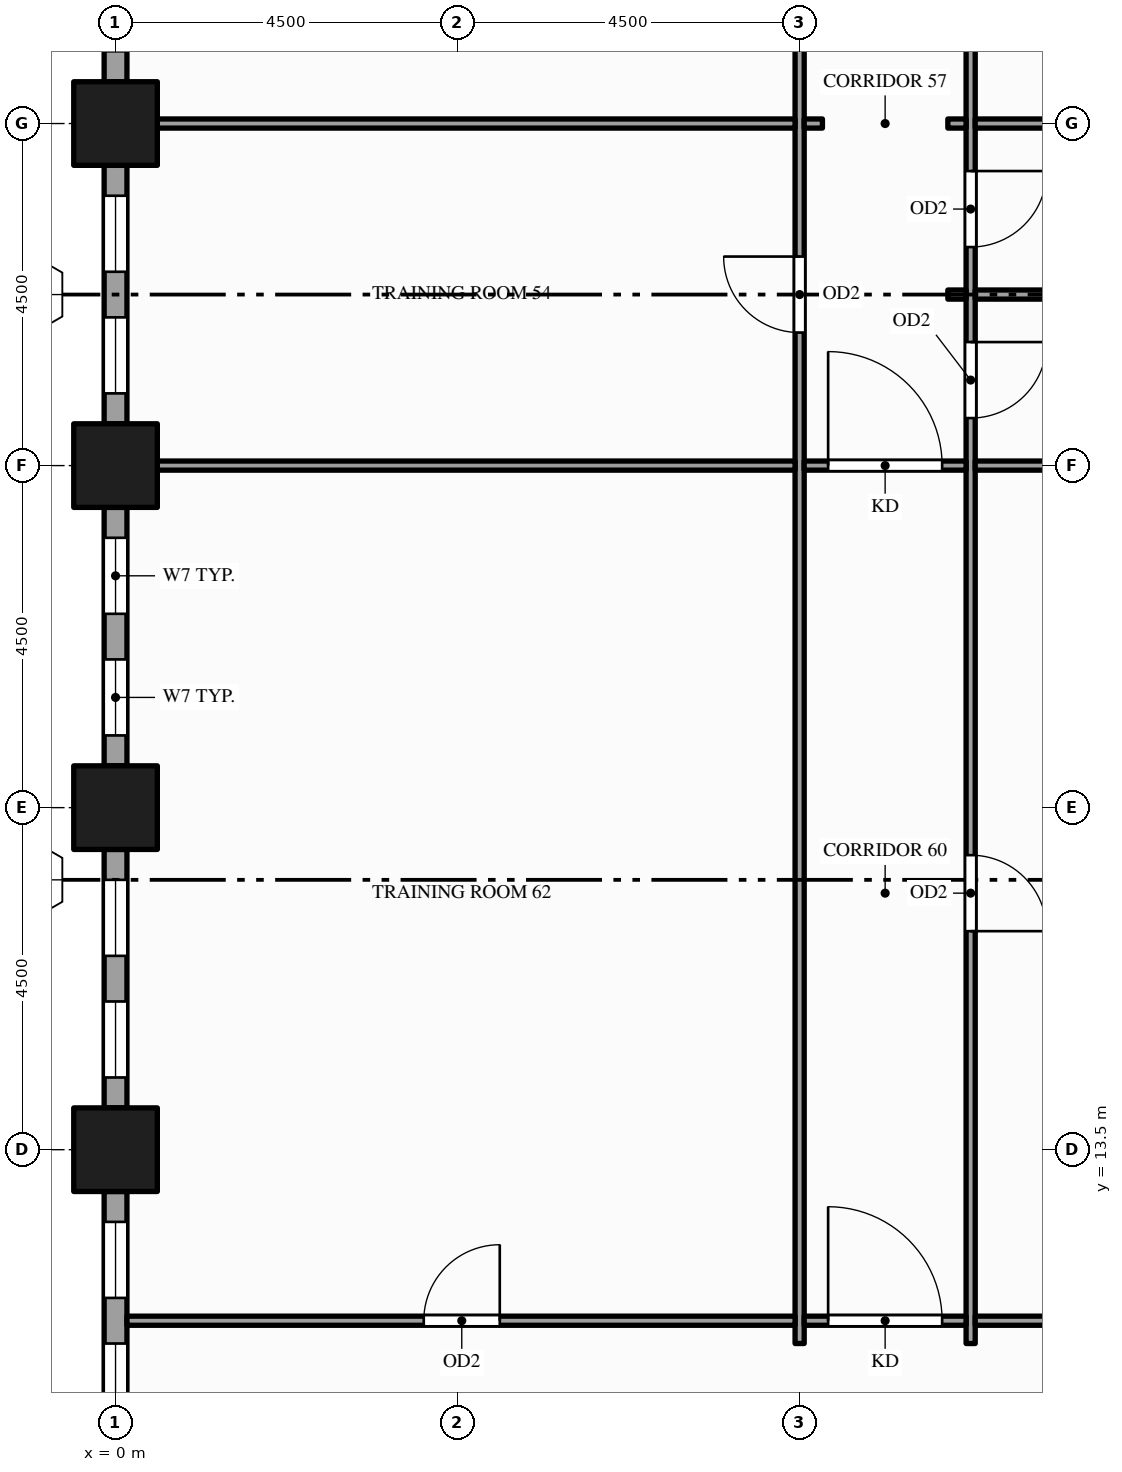
"""IFC4 building model, lengths in metres.
Left out: names, types, materials, properties, quantities, classifications, styles, units other than length and angle.
Written with IfcOpenShell. Run it as: python <this file> out.ifc"""

import sys

from ifc_helpers import new_model, si_unit, direction, frame, frame_2d, origin, origin_2d, place, context, subcontext, project, spatial, rectangle, hollow_rectangle, extrude, element, fill, save


model = new_model("IFC4")
c1 = context("Model", 3, precision=1e-05, world=origin(), true_north=direction((0.0, 1.0)))
c2 = subcontext(c1, "Body", "Model", "MODEL_VIEW")
j1 = project(units=[si_unit("LENGTHUNIT", "METRE"), si_unit("PLANEANGLEUNIT", "RADIAN")], contexts=[c1])
p1 = place(None, origin())
s1 = spatial("IfcSite", under=j1, at=p1, CompositionType="ELEMENT")
p2 = place(p1, origin())
s2 = spatial("IfcBuilding", under=s1, at=p2, CompositionType="ELEMENT")
p3 = place(p2, frame((0.0, 0.0, 24.0)))
s3 = spatial("IfcBuildingStorey", under=s2, at=p3, CompositionType="ELEMENT", Elevation=24.0)
for number, where, z_axis, x_axis in (
    (1, (0.0, 13.5, -0.25), (0.0, 0.0, 1.0), (1.0, 0.0, 0.0)),
    (2, (0.0, 18.0, -0.25), (0.0, 0.0, 1.0), (1.0, 0.0, 0.0)),
    (3, (0.0, 22.5, -0.25), (0.0, 0.0, 1.0), (1.0, 0.0, 0.0)),
    (4, (0.0, 27.0, -0.25), (0.0, 0.0, 1.0), (1.0, 0.0, 0.0)),
):
    element("IfcColumn", number, at=place(p3, frame(where, z_axis=z_axis, x_axis=x_axis)), inside=s3, PredefinedType="COLUMN", context=c2, shape_type="SweptSolid", body=[
        extrude(hollow_rectangle(XDim=1.1, YDim=1.1, WallThickness=0.06, at=origin_2d()), origin(), (0.0, 0.0, 1.0), 5.1),
    ])
p4 = place(p3, frame((0.0, 30.95, 0.0), z_axis=(0.0, 0.0, 1.0), x_axis=(0.0, -1.0, 0.0)))
e5 = element("IfcWall", 5, at=p4, inside=s3, PredefinedType="STANDARD", context=c2, shape_type="SweptSolid", body=[
    extrude(rectangle(XDim=3.4, YDim=0.3, at=frame_2d((1.7, 0.0))), origin(), (0.0, 0.0, 1.0), 3.938),
])
p5 = place(p4, frame((0.4, 0.0, 0.9)))
e6 = element("IfcOpeningElement", 6, at=p5, cuts=e5, PredefinedType="OPENING", context=c2, shape_type="SweptSolid", body=[
    extrude(rectangle(XDim=1.0, YDim=2.75, at=frame_2d((0.5, 1.375))), frame((0.0, 0.16, 0.0), z_axis=(0.0, -1.0, 0.0), x_axis=(1.0, 0.0, 0.0)), (0.0, 0.0, 1.0), 0.32),
])
p6 = place(p4, frame((2.0, 0.0, 0.9)))
e7 = element("IfcOpeningElement", 7, at=p6, cuts=e5, PredefinedType="OPENING", context=c2, shape_type="SweptSolid", body=[
    extrude(rectangle(XDim=1.0, YDim=2.75, at=frame_2d((0.5, 1.375))), frame((0.0, 0.16, 0.0), z_axis=(0.0, -1.0, 0.0), x_axis=(1.0, 0.0, 0.0)), (0.0, 0.0, 1.0), 0.32),
])
p7 = place(p3, frame((0.0, 26.45, 0.0), z_axis=(0.0, 0.0, 1.0), x_axis=(0.0, -1.0, 0.0)))
e8 = element("IfcWall", 8, at=p7, inside=s3, PredefinedType="STANDARD", context=c2, shape_type="SweptSolid", body=[
    extrude(rectangle(XDim=3.4, YDim=0.3, at=frame_2d((1.7, 0.0))), origin(), (0.0, 0.0, 1.0), 3.938),
])
p8 = place(p7, frame((0.4, 0.0, 0.9)))
e9 = element("IfcOpeningElement", 9, at=p8, cuts=e8, PredefinedType="OPENING", context=c2, shape_type="SweptSolid", body=[
    extrude(rectangle(XDim=1.0, YDim=2.75, at=frame_2d((0.5, 1.375))), frame((0.0, 0.16, 0.0), z_axis=(0.0, -1.0, 0.0), x_axis=(1.0, 0.0, 0.0)), (0.0, 0.0, 1.0), 0.32),
])
p9 = place(p7, frame((2.0, 0.0, 0.9)))
e10 = element("IfcOpeningElement", 10, at=p9, cuts=e8, PredefinedType="OPENING", context=c2, shape_type="SweptSolid", body=[
    extrude(rectangle(XDim=1.0, YDim=2.75, at=frame_2d((0.5, 1.375))), frame((0.0, 0.16, 0.0), z_axis=(0.0, -1.0, 0.0), x_axis=(1.0, 0.0, 0.0)), (0.0, 0.0, 1.0), 0.32),
])
p10 = place(p3, frame((0.0, 21.95, 0.0), z_axis=(0.0, 0.0, 1.0), x_axis=(0.0, -1.0, 0.0)))
e11 = element("IfcWall", 11, at=p10, inside=s3, PredefinedType="STANDARD", context=c2, shape_type="SweptSolid", body=[
    extrude(rectangle(XDim=3.4, YDim=0.3, at=frame_2d((1.7, 0.0))), origin(), (0.0, 0.0, 1.0), 4.136),
])
p11 = place(p10, frame((0.4, 0.0, 0.9)))
e12 = element("IfcOpeningElement", 12, at=p11, cuts=e11, PredefinedType="OPENING", context=c2, shape_type="SweptSolid", body=[
    extrude(rectangle(XDim=1.0, YDim=3.0, at=frame_2d((0.5, 1.5))), frame((0.0, 0.16, 0.0), z_axis=(0.0, -1.0, 0.0), x_axis=(1.0, 0.0, 0.0)), (0.0, 0.0, 1.0), 0.32),
])
p12 = place(p10, frame((2.0, 0.0, 0.9)))
e13 = element("IfcOpeningElement", 13, at=p12, cuts=e11, PredefinedType="OPENING", context=c2, shape_type="SweptSolid", body=[
    extrude(rectangle(XDim=1.0, YDim=3.0, at=frame_2d((0.5, 1.5))), frame((0.0, 0.16, 0.0), z_axis=(0.0, -1.0, 0.0), x_axis=(1.0, 0.0, 0.0)), (0.0, 0.0, 1.0), 0.32),
])
p13 = place(p3, frame((0.0, 17.45, 0.0), z_axis=(0.0, 0.0, 1.0), x_axis=(0.0, -1.0, 0.0)))
e14 = element("IfcWall", 14, at=p13, inside=s3, PredefinedType="STANDARD", context=c2, shape_type="SweptSolid", body=[
    extrude(rectangle(XDim=3.4, YDim=0.3, at=frame_2d((1.7, 0.0))), origin(), (0.0, 0.0, 1.0), 4.136),
])
p14 = place(p13, frame((0.4, 0.0, 0.9)))
e15 = element("IfcOpeningElement", 15, at=p14, cuts=e14, PredefinedType="OPENING", context=c2, shape_type="SweptSolid", body=[
    extrude(rectangle(XDim=1.0, YDim=3.0, at=frame_2d((0.5, 1.5))), frame((0.0, 0.16, 0.0), z_axis=(0.0, -1.0, 0.0), x_axis=(1.0, 0.0, 0.0)), (0.0, 0.0, 1.0), 0.32),
])
p15 = place(p13, frame((2.0, 0.0, 0.9)))
e16 = element("IfcOpeningElement", 16, at=p15, cuts=e14, PredefinedType="OPENING", context=c2, shape_type="SweptSolid", body=[
    extrude(rectangle(XDim=1.0, YDim=3.0, at=frame_2d((0.5, 1.5))), frame((0.0, 0.16, 0.0), z_axis=(0.0, -1.0, 0.0), x_axis=(1.0, 0.0, 0.0)), (0.0, 0.0, 1.0), 0.32),
])
p16 = place(p3, frame((0.0, 12.95, 0.0), z_axis=(0.0, 0.0, 1.0), x_axis=(0.0, -1.0, 0.0)))
e17 = element("IfcWall", 17, at=p16, inside=s3, PredefinedType="STANDARD", context=c2, shape_type="SweptSolid", body=[
    extrude(rectangle(XDim=3.4, YDim=0.3, at=frame_2d((1.7, 0.0))), origin(), (0.0, 0.0, 1.0), 4.136),
])
p17 = place(p16, frame((0.4, 0.0, 0.9)))
e18 = element("IfcOpeningElement", 18, at=p17, cuts=e17, PredefinedType="OPENING", context=c2, shape_type="SweptSolid", body=[
    extrude(rectangle(XDim=1.0, YDim=3.0, at=frame_2d((0.5, 1.5))), frame((0.0, 0.16, 0.0), z_axis=(0.0, -1.0, 0.0), x_axis=(1.0, 0.0, 0.0)), (0.0, 0.0, 1.0), 0.32),
])
p18 = place(p16, frame((2.0, 0.0, 0.9)))
e19 = element("IfcOpeningElement", 19, at=p18, cuts=e17, PredefinedType="OPENING", context=c2, shape_type="SweptSolid", body=[
    extrude(rectangle(XDim=1.0, YDim=3.0, at=frame_2d((0.5, 1.5))), frame((0.0, 0.16, 0.0), z_axis=(0.0, -1.0, 0.0), x_axis=(1.0, 0.0, 0.0)), (0.0, 0.0, 1.0), 0.32),
])
p19 = place(p3, frame((9.0, 10.95, 0.0), z_axis=(0.0, 0.0, 1.0), x_axis=(0.0, 1.0, 0.0)))
e20 = element("IfcWall", 20, at=p19, inside=s3, PredefinedType="PARTITIONING", context=c2, shape_type="SweptSolid", body=[
    extrude(rectangle(XDim=20.85, YDim=0.12, at=frame_2d((10.425, 0.0))), origin(), (0.0, 0.0, 1.0), 3.6),
])
p20 = place(p19, frame((13.3, 0.0, 0.0)))
e21 = element("IfcOpeningElement", 21, at=p20, cuts=e20, PredefinedType="OPENING", context=c2, shape_type="SweptSolid", body=[
    extrude(rectangle(XDim=1.0, YDim=2.1, at=frame_2d((0.5, 1.05))), frame((0.0, 0.07, 0.0), z_axis=(0.0, -1.0, 0.0), x_axis=(1.0, 0.0, 0.0)), (0.0, 0.0, 1.0), 0.14),
])
p21 = place(p19, frame((17.8, 0.0, 0.0)))
e22 = element("IfcOpeningElement", 22, at=p21, cuts=e20, PredefinedType="OPENING", context=c2, shape_type="SweptSolid", body=[
    extrude(rectangle(XDim=1.0, YDim=2.1, at=frame_2d((0.5, 1.05))), frame((0.0, 0.07, 0.0), z_axis=(0.0, -1.0, 0.0), x_axis=(1.0, 0.0, 0.0)), (0.0, 0.0, 1.0), 0.14),
])
p22 = place(p3, frame((11.25, 10.95, 0.0), z_axis=(0.0, 0.0, 1.0), x_axis=(0.0, 1.0, 0.0)))
e23 = element("IfcWall", 23, at=p22, inside=s3, PredefinedType="PARTITIONING", context=c2, shape_type="SweptSolid", body=[
    extrude(rectangle(XDim=20.85, YDim=0.12, at=frame_2d((10.425, 0.0))), origin(), (0.0, 0.0, 1.0), 3.6),
])
p23 = place(p22, frame((5.425, 0.0, 0.0)))
e24 = element("IfcOpeningElement", 24, at=p23, cuts=e23, PredefinedType="OPENING", context=c2, shape_type="SweptSolid", body=[
    extrude(rectangle(XDim=1.0, YDim=2.1, at=frame_2d((0.5, 1.05))), frame((0.0, 0.07, 0.0), z_axis=(0.0, -1.0, 0.0), x_axis=(1.0, 0.0, 0.0)), (0.0, 0.0, 1.0), 0.14),
])
p24 = place(p22, frame((12.175, 0.0, 0.0)))
e25 = element("IfcOpeningElement", 25, at=p24, cuts=e23, PredefinedType="OPENING", context=c2, shape_type="SweptSolid", body=[
    extrude(rectangle(XDim=1.0, YDim=2.1, at=frame_2d((0.5, 1.05))), frame((0.0, 0.07, 0.0), z_axis=(0.0, -1.0, 0.0), x_axis=(1.0, 0.0, 0.0)), (0.0, 0.0, 1.0), 0.14),
])
p25 = place(p22, frame((14.425, 0.0, 0.0)))
e26 = element("IfcOpeningElement", 26, at=p25, cuts=e23, PredefinedType="OPENING", context=c2, shape_type="SweptSolid", body=[
    extrude(rectangle(XDim=1.0, YDim=2.1, at=frame_2d((0.5, 1.05))), frame((0.0, 0.07, 0.0), z_axis=(0.0, -1.0, 0.0), x_axis=(1.0, 0.0, 0.0)), (0.0, 0.0, 1.0), 0.14),
])
p26 = place(p22, frame((17.8, 0.0, 0.0)))
e27 = element("IfcOpeningElement", 27, at=p26, cuts=e23, PredefinedType="OPENING", context=c2, shape_type="SweptSolid", body=[
    extrude(rectangle(XDim=1.0, YDim=2.1, at=frame_2d((0.5, 1.05))), frame((0.0, 0.07, 0.0), z_axis=(0.0, -1.0, 0.0), x_axis=(1.0, 0.0, 0.0)), (0.0, 0.0, 1.0), 0.14),
])
p27 = place(p3, frame((0.15, 11.25, 0.0), z_axis=(0.0, 0.0, 1.0), x_axis=(1.0, 0.0, 0.0)))
e28 = element("IfcWall", 28, at=p27, inside=s3, PredefinedType="PARTITIONING", context=c2, shape_type="SweptSolid", body=[
    extrude(rectangle(XDim=8.79, YDim=0.12, at=frame_2d((4.395, 0.0))), origin(), (0.0, 0.0, 1.0), 3.938),
])
p28 = place(p27, frame((3.905, 0.0, 0.0)))
e29 = element("IfcOpeningElement", 29, at=p28, cuts=e28, PredefinedType="OPENING", context=c2, shape_type="SweptSolid", body=[
    extrude(rectangle(XDim=1.0, YDim=2.1, at=frame_2d((0.5, 1.05))), frame((0.0, 0.07, 0.0), z_axis=(0.0, -1.0, 0.0), x_axis=(1.0, 0.0, 0.0)), (0.0, 0.0, 1.0), 0.14),
])
p29 = place(p3, frame((9.06, 11.25, 0.0), z_axis=(0.0, 0.0, 1.0), x_axis=(1.0, 0.0, 0.0)))
e30 = element("IfcWall", 30, at=p29, inside=s3, PredefinedType="PARTITIONING", context=c2, shape_type="SweptSolid", body=[
    extrude(rectangle(XDim=2.13, YDim=0.12, at=frame_2d((1.065, 0.0))), origin(), (0.0, 0.0, 1.0), 3.938),
])
p30 = place(p29, frame((0.315, 0.0, 0.0)))
e31 = element("IfcOpeningElement", 31, at=p30, cuts=e30, PredefinedType="OPENING", context=c2, shape_type="SweptSolid", body=[
    extrude(rectangle(XDim=1.5, YDim=2.1, at=frame_2d((0.75, 1.05))), frame((0.0, 0.07, 0.0), z_axis=(0.0, -1.0, 0.0), x_axis=(1.0, 0.0, 0.0)), (0.0, 0.0, 1.0), 0.14),
])
p31 = place(p3, frame((11.31, 11.25, 0.0), z_axis=(0.0, 0.0, 1.0), x_axis=(1.0, 0.0, 0.0)))
e32 = element("IfcWall", 32, at=p31, inside=s3, PredefinedType="PARTITIONING", context=c2, shape_type="SweptSolid", body=[
    extrude(rectangle(XDim=11.13, YDim=0.12, at=frame_2d((5.565, 0.0))), origin(), (0.0, 0.0, 1.0), 3.938),
])
p32 = place(p3, frame((0.15, 22.5, 0.0), z_axis=(0.0, 0.0, 1.0), x_axis=(1.0, 0.0, 0.0)))
e33 = element("IfcWall", 33, at=p32, inside=s3, PredefinedType="PARTITIONING", context=c2, shape_type="SweptSolid", body=[
    extrude(rectangle(XDim=8.79, YDim=0.12, at=frame_2d((4.395, 0.0))), origin(), (0.0, 0.0, 1.0), 3.6),
])
p33 = place(p3, frame((9.06, 22.5, 0.0), z_axis=(0.0, 0.0, 1.0), x_axis=(1.0, 0.0, 0.0)))
e34 = element("IfcWall", 34, at=p33, inside=s3, PredefinedType="PARTITIONING", context=c2, shape_type="SweptSolid", body=[
    extrude(rectangle(XDim=2.13, YDim=0.12, at=frame_2d((1.065, 0.0))), origin(), (0.0, 0.0, 1.0), 3.6),
])
p34 = place(p33, frame((0.315, 0.0, 0.0)))
e35 = element("IfcOpeningElement", 35, at=p34, cuts=e34, PredefinedType="OPENING", context=c2, shape_type="SweptSolid", body=[
    extrude(rectangle(XDim=1.5, YDim=2.1, at=frame_2d((0.75, 1.05))), frame((0.0, 0.07, 0.0), z_axis=(0.0, -1.0, 0.0), x_axis=(1.0, 0.0, 0.0)), (0.0, 0.0, 1.0), 0.14),
])
p35 = place(p3, frame((11.31, 22.5, 0.0), z_axis=(0.0, 0.0, 1.0), x_axis=(1.0, 0.0, 0.0)))
e36 = element("IfcWall", 36, at=p35, inside=s3, PredefinedType="PARTITIONING", context=c2, shape_type="SweptSolid", body=[
    extrude(rectangle(XDim=11.13, YDim=0.12, at=frame_2d((5.565, 0.0))), origin(), (0.0, 0.0, 1.0), 3.6),
])
p36 = place(p3, frame((10.95, 24.75, 0.0), z_axis=(0.0, 0.0, 1.0), x_axis=(1.0, 0.0, 0.0)))
e37 = element("IfcWall", 37, at=p36, inside=s3, PredefinedType="PARTITIONING", context=c2, shape_type="SweptSolid", body=[
    extrude(rectangle(XDim=0.24, YDim=0.12, at=frame_2d((0.12, 0.0))), origin(), (0.0, 0.0, 1.0), 3.938),
])
p37 = place(p3, frame((11.31, 24.75, 0.0), z_axis=(0.0, 0.0, 1.0), x_axis=(1.0, 0.0, 0.0)))
e38 = element("IfcWall", 38, at=p37, inside=s3, PredefinedType="PARTITIONING", context=c2, shape_type="SweptSolid", body=[
    extrude(rectangle(XDim=11.13, YDim=0.12, at=frame_2d((5.565, 0.0))), origin(), (0.0, 0.0, 1.0), 3.938),
])
p38 = place(p3, frame((0.15, 27.0, 0.0), z_axis=(0.0, 0.0, 1.0), x_axis=(1.0, 0.0, 0.0)))
e39 = element("IfcWall", 39, at=p38, inside=s3, PredefinedType="PARTITIONING", context=c2, shape_type="SweptSolid", body=[
    extrude(rectangle(XDim=8.79, YDim=0.12, at=frame_2d((4.395, 0.0))), origin(), (0.0, 0.0, 1.0), 3.938),
])
for number, where, z_axis, x_axis in (
    (40, (9.06, 27.0, 0.0), (0.0, 0.0, 1.0), (1.0, 0.0, 0.0)),
    (41, (10.95, 27.0, 0.0), (0.0, 0.0, 1.0), (1.0, 0.0, 0.0)),
):
    element("IfcWall", number, at=place(p3, frame(where, z_axis=z_axis, x_axis=x_axis)), inside=s3, PredefinedType="PARTITIONING", context=c2, shape_type="SweptSolid", body=[
        extrude(rectangle(XDim=0.24, YDim=0.12, at=frame_2d((0.12, 0.0))), origin(), (0.0, 0.0, 1.0), 3.938),
    ])
p39 = place(p3, frame((11.31, 27.0, 0.0), z_axis=(0.0, 0.0, 1.0), x_axis=(1.0, 0.0, 0.0)))
e42 = element("IfcWall", 42, at=p39, inside=s3, PredefinedType="PARTITIONING", context=c2, shape_type="SweptSolid", body=[
    extrude(rectangle(XDim=11.13, YDim=0.12, at=frame_2d((5.565, 0.0))), origin(), (0.0, 0.0, 1.0), 3.788),
])
p40 = place(p8, origin())
e43 = element("IfcWindow", 43, at=p40, inside=s3, PartitioningType="SINGLE_PANEL", PredefinedType="WINDOW", context=c2, shape_type="SweptSolid", body=[
    extrude(rectangle(XDim=1.0, YDim=2.75, at=frame_2d((0.5, 1.375))), frame((0.0, 0.03, 0.0), z_axis=(0.0, -1.0, 0.0), x_axis=(1.0, 0.0, 0.0)), (0.0, 0.0, 1.0), 0.06),
])
fill(e9, e43)
p41 = place(p9, origin())
e44 = element("IfcWindow", 44, at=p41, inside=s3, PartitioningType="SINGLE_PANEL", PredefinedType="WINDOW", context=c2, shape_type="SweptSolid", body=[
    extrude(rectangle(XDim=1.0, YDim=2.75, at=frame_2d((0.5, 1.375))), frame((0.0, 0.03, 0.0), z_axis=(0.0, -1.0, 0.0), x_axis=(1.0, 0.0, 0.0)), (0.0, 0.0, 1.0), 0.06),
])
fill(e10, e44)
p42 = place(p11, origin())
e45 = element("IfcWindow", 45, at=p42, inside=s3, PartitioningType="SINGLE_PANEL", PredefinedType="WINDOW", context=c2, shape_type="SweptSolid", body=[
    extrude(rectangle(XDim=1.0, YDim=3.0, at=frame_2d((0.5, 1.5))), frame((0.0, 0.03, 0.0), z_axis=(0.0, -1.0, 0.0), x_axis=(1.0, 0.0, 0.0)), (0.0, 0.0, 1.0), 0.06),
])
fill(e12, e45)
p43 = place(p12, origin())
e46 = element("IfcWindow", 46, at=p43, inside=s3, PartitioningType="SINGLE_PANEL", PredefinedType="WINDOW", context=c2, shape_type="SweptSolid", body=[
    extrude(rectangle(XDim=1.0, YDim=3.0, at=frame_2d((0.5, 1.5))), frame((0.0, 0.03, 0.0), z_axis=(0.0, -1.0, 0.0), x_axis=(1.0, 0.0, 0.0)), (0.0, 0.0, 1.0), 0.06),
])
fill(e13, e46)
p44 = place(p14, origin())
e47 = element("IfcWindow", 47, at=p44, inside=s3, PartitioningType="SINGLE_PANEL", PredefinedType="WINDOW", context=c2, shape_type="SweptSolid", body=[
    extrude(rectangle(XDim=1.0, YDim=3.0, at=frame_2d((0.5, 1.5))), frame((0.0, 0.03, 0.0), z_axis=(0.0, -1.0, 0.0), x_axis=(1.0, 0.0, 0.0)), (0.0, 0.0, 1.0), 0.06),
])
fill(e15, e47)
p45 = place(p15, origin())
e48 = element("IfcWindow", 48, at=p45, inside=s3, PartitioningType="SINGLE_PANEL", PredefinedType="WINDOW", context=c2, shape_type="SweptSolid", body=[
    extrude(rectangle(XDim=1.0, YDim=3.0, at=frame_2d((0.5, 1.5))), frame((0.0, 0.03, 0.0), z_axis=(0.0, -1.0, 0.0), x_axis=(1.0, 0.0, 0.0)), (0.0, 0.0, 1.0), 0.06),
])
fill(e16, e48)
p46 = place(p17, origin())
e49 = element("IfcWindow", 49, at=p46, inside=s3, PartitioningType="SINGLE_PANEL", PredefinedType="WINDOW", context=c2, shape_type="SweptSolid", body=[
    extrude(rectangle(XDim=1.0, YDim=3.0, at=frame_2d((0.5, 1.5))), frame((0.0, 0.03, 0.0), z_axis=(0.0, -1.0, 0.0), x_axis=(1.0, 0.0, 0.0)), (0.0, 0.0, 1.0), 0.06),
])
fill(e18, e49)
p47 = place(p18, origin())
e50 = element("IfcWindow", 50, at=p47, inside=s3, PartitioningType="SINGLE_PANEL", PredefinedType="WINDOW", context=c2, shape_type="SweptSolid", body=[
    extrude(rectangle(XDim=1.0, YDim=3.0, at=frame_2d((0.5, 1.5))), frame((0.0, 0.03, 0.0), z_axis=(0.0, -1.0, 0.0), x_axis=(1.0, 0.0, 0.0)), (0.0, 0.0, 1.0), 0.06),
])
fill(e19, e50)
p48 = place(p30, origin())
e51 = element("IfcDoor", 51, at=p48, inside=s3, OperationType="SINGLE_SWING_LEFT", PredefinedType="DOOR", context=c2, shape_type="SweptSolid", body=[
    extrude(rectangle(XDim=1.5, YDim=2.1, at=frame_2d((0.75, 1.05))), frame((0.0, 0.025, 0.0), z_axis=(0.0, -1.0, 0.0), x_axis=(1.0, 0.0, 0.0)), (0.0, 0.0, 1.0), 0.05),
])
fill(e31, e51)
p49 = place(p28, origin())
e52 = element("IfcDoor", 52, at=p49, inside=s3, OperationType="SINGLE_SWING_RIGHT", PredefinedType="DOOR", context=c2, shape_type="SweptSolid", body=[
    extrude(rectangle(XDim=1.0, YDim=2.1, at=frame_2d((0.5, 1.05))), frame((0.0, 0.025, 0.0), z_axis=(0.0, -1.0, 0.0), x_axis=(1.0, 0.0, 0.0)), (0.0, 0.0, 1.0), 0.05),
])
fill(e29, e52)
p50 = place(p23, origin())
e53 = element("IfcDoor", 53, at=p50, inside=s3, OperationType="SINGLE_SWING_LEFT", PredefinedType="DOOR", context=c2, shape_type="SweptSolid", body=[
    extrude(rectangle(XDim=1.0, YDim=2.1, at=frame_2d((0.5, 1.05))), frame((0.0, 0.025, 0.0), z_axis=(0.0, -1.0, 0.0), x_axis=(1.0, 0.0, 0.0)), (0.0, 0.0, 1.0), 0.05),
])
fill(e24, e53)
p51 = place(p34, origin())
e54 = element("IfcDoor", 54, at=p51, inside=s3, OperationType="SINGLE_SWING_LEFT", PredefinedType="DOOR", context=c2, shape_type="SweptSolid", body=[
    extrude(rectangle(XDim=1.5, YDim=2.1, at=frame_2d((0.75, 1.05))), frame((0.0, 0.025, 0.0), z_axis=(0.0, -1.0, 0.0), x_axis=(1.0, 0.0, 0.0)), (0.0, 0.0, 1.0), 0.05),
])
fill(e35, e54)
p52 = place(p20, origin())
e55 = element("IfcDoor", 55, at=p52, inside=s3, OperationType="SINGLE_SWING_RIGHT", PredefinedType="DOOR", context=c2, shape_type="SweptSolid", body=[
    extrude(rectangle(XDim=1.0, YDim=2.1, at=frame_2d((0.5, 1.05))), frame((0.0, 0.025, 0.0), z_axis=(0.0, -1.0, 0.0), x_axis=(1.0, 0.0, 0.0)), (0.0, 0.0, 1.0), 0.05),
])
fill(e21, e55)
p53 = place(p24, origin())
e56 = element("IfcDoor", 56, at=p53, inside=s3, OperationType="SINGLE_SWING_RIGHT", PredefinedType="DOOR", context=c2, shape_type="SweptSolid", body=[
    extrude(rectangle(XDim=1.0, YDim=2.1, at=frame_2d((0.5, 1.05))), frame((0.0, 0.025, 0.0), z_axis=(0.0, -1.0, 0.0), x_axis=(1.0, 0.0, 0.0)), (0.0, 0.0, 1.0), 0.05),
])
fill(e25, e56)
p54 = place(p25, origin())
e57 = element("IfcDoor", 57, at=p54, inside=s3, OperationType="SINGLE_SWING_RIGHT", PredefinedType="DOOR", context=c2, shape_type="SweptSolid", body=[
    extrude(rectangle(XDim=1.0, YDim=2.1, at=frame_2d((0.5, 1.05))), frame((0.0, 0.025, 0.0), z_axis=(0.0, -1.0, 0.0), x_axis=(1.0, 0.0, 0.0)), (0.0, 0.0, 1.0), 0.05),
])
fill(e26, e57)
save(model, sys.argv[1])
